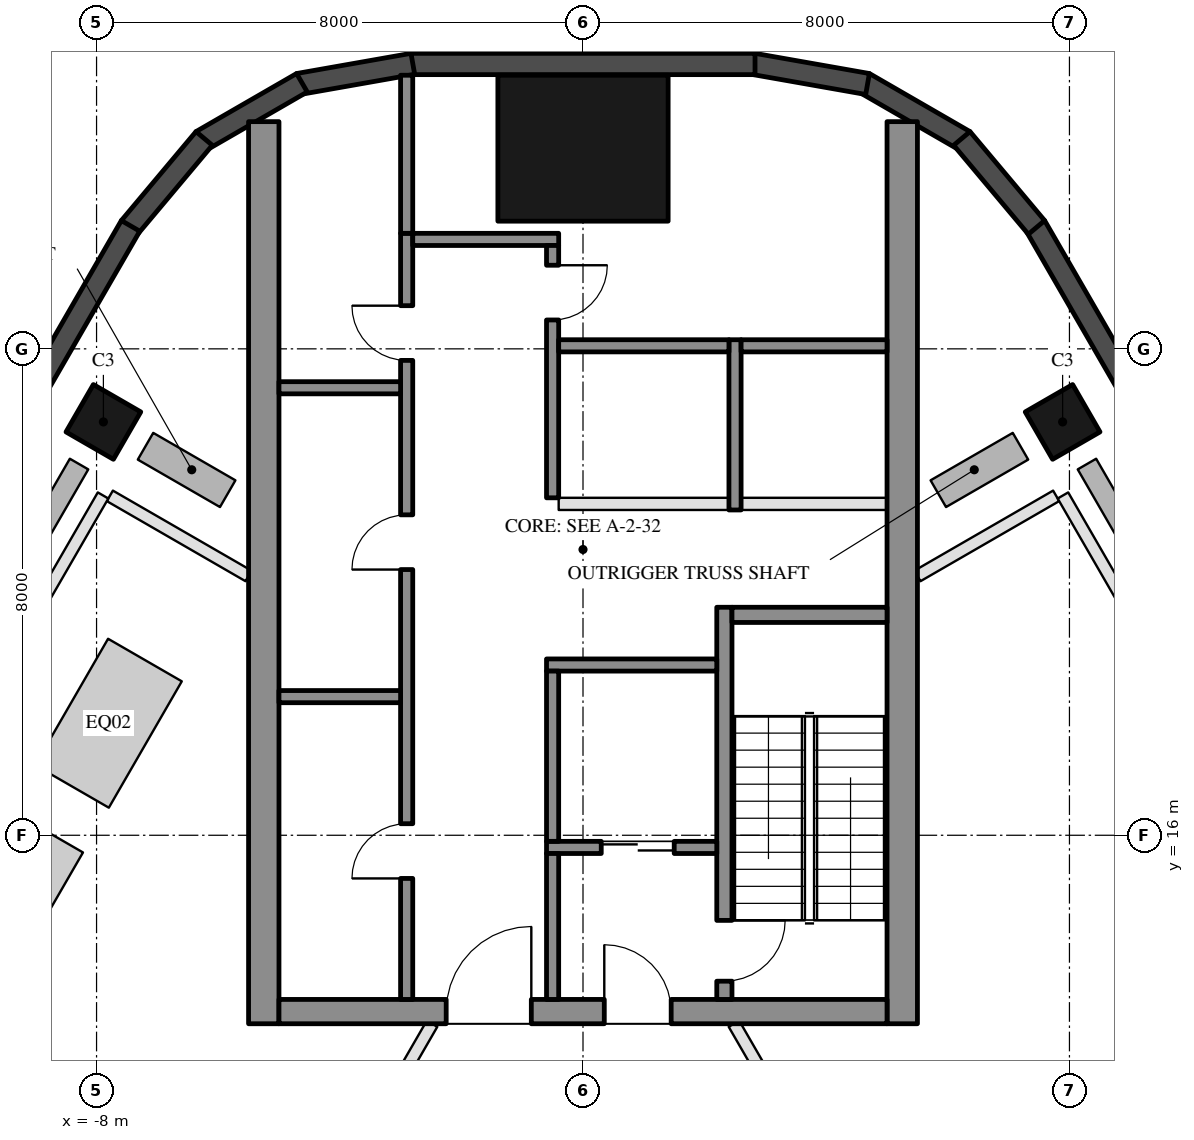
"""IFC4 building model, lengths in metres.
Left out: names, types, materials, properties, quantities, classifications, styles, units other than length and angle.
Written with IfcOpenShell. Run it as: python <this file> out.ifc"""

import sys

from ifc_helpers import new_model, si_unit, direction, frame, frame_2d, origin, origin_2d, place, context, subcontext, project, spatial, rectangle, hollow_rectangle, extrude, element, fill, save


model = new_model("IFC4")
c1 = context("Model", 3, precision=1e-05, world=origin(), true_north=direction((0.0, 1.0)))
c2 = subcontext(c1, "Body", "Model", "MODEL_VIEW")
j1 = project(units=[si_unit("LENGTHUNIT", "METRE"), si_unit("PLANEANGLEUNIT", "RADIAN")], contexts=[c1])
p1 = place(None, origin())
s1 = spatial("IfcSite", under=j1, at=p1, CompositionType="ELEMENT")
p2 = place(p1, origin())
s2 = spatial("IfcBuilding", under=s1, at=p2, CompositionType="ELEMENT")
p3 = place(p2, frame((0.0, 0.0, 142.1)))
s3 = spatial("IfcBuildingStorey", under=s2, at=p3, CompositionType="ELEMENT", Elevation=142.1)
for number, where, z_axis, x_axis in (
    (1, (7.888, 22.798, 0.0), (0.0, 0.0, 1.0), (-0.5, 0.866, 0.0)),
    (2, (-7.888, 22.798, 0.0), (0.0, 0.0, 1.0), (0.5, 0.866, 0.0)),
):
    element("IfcColumn", number, at=place(p3, frame(where, z_axis=z_axis, x_axis=x_axis)), inside=s3, PredefinedType="COLUMN", context=c2, shape_type="SweptSolid", body=[
        extrude(hollow_rectangle(XDim=0.9, YDim=0.9, WallThickness=0.04, at=origin_2d()), origin(), (0.0, 0.0, 1.0), 4.5),
    ])
p4 = place(p3, frame((0.0, 27.3, 0.0), z_axis=(0.0, 0.0, 1.0), x_axis=(1.0, 0.0, 0.0)))
e3 = element("IfcColumn", 3, at=p4, inside=s3, PredefinedType="COLUMN", context=c2, shape_type="SweptSolid", body=[
    extrude(hollow_rectangle(XDim=2.8, YDim=2.4, WallThickness=0.07, at=origin_2d()), origin(), (0.0, 0.0, 1.0), 4.5),
])
for number, where, z_axis, x_axis in (
    (4, (6.277, 27.422, 0.0), (0.0, 0.0, 1.0), (-0.866, 0.5, 0.0)),
    (5, (4.68, 28.356, 0.0), (0.0, 0.0, 1.0), (-0.985, 0.174, 0.0)),
):
    element("IfcWall", number, at=place(p3, frame(where, z_axis=z_axis, x_axis=x_axis)), inside=s3, PredefinedType="SOLIDWALL", context=c2, shape_type="SweptSolid", body=[
        extrude(rectangle(XDim=1.91, YDim=0.35, at=frame_2d((0.955, 0.0))), origin(), (0.0, 0.0, 1.0), 4.35),
    ])
p5 = place(p3, frame((2.829, 28.685, 0.0), z_axis=(0.0, 0.0, 1.0), x_axis=(-1.0, 0.0, 0.0)))
e6 = element("IfcWall", 6, at=p5, inside=s3, PredefinedType="SOLIDWALL", context=c2, shape_type="SweptSolid", body=[
    extrude(rectangle(XDim=5.658, YDim=0.35, at=frame_2d((2.829, 0.0))), origin(), (0.0, 0.0, 1.0), 4.35),
])
for number, where, z_axis, x_axis in (
    (7, (-2.799, 28.688, 0.0), (0.0, 0.0, 1.0), (-0.985, -0.174, 0.0)),
    (8, (-4.623, 28.377, 0.0), (0.0, 0.0, 1.0), (-0.866, -0.5, 0.0)),
):
    element("IfcWall", number, at=place(p3, frame(where, z_axis=z_axis, x_axis=x_axis)), inside=s3, PredefinedType="SOLIDWALL", context=c2, shape_type="SweptSolid", body=[
        extrude(rectangle(XDim=1.91, YDim=0.35, at=frame_2d((0.955, 0.0))), origin(), (0.0, 0.0, 1.0), 4.35),
    ])
p6 = place(p3, frame((-6.23, 27.461, 0.0), z_axis=(0.0, 0.0, 1.0), x_axis=(-0.642808304945, -0.766027077259, 0.0)))
e9 = element("IfcWall", 9, at=p6, inside=s3, PredefinedType="SOLIDWALL", context=c2, shape_type="SweptSolid", body=[
    extrude(rectangle(XDim=1.91, YDim=0.35, at=frame_2d((0.955, 0.0))), origin(), (0.0, 0.0, 1.0), 4.35),
])
for number, where, z_axis, x_axis in (
    (10, (-7.441, 26.022, 0.0), (0.0, 0.0, 1.0), (-0.5, -0.866, 0.0)),
    (11, (26.256, -6.567, 0.0), (0.0, 0.0, 1.0), (-0.5, 0.866, 0.0)),
):
    element("IfcWall", number, at=place(p3, frame(where, z_axis=z_axis, x_axis=x_axis)), inside=s3, PredefinedType="SOLIDWALL", context=c2, shape_type="SweptSolid", body=[
        extrude(rectangle(XDim=37.631, YDim=0.35, at=frame_2d((18.816, 0.0))), origin(), (0.0, 0.0, 1.0), 4.35),
    ])
p7 = place(p3, frame((7.458, 25.998, 0.0), z_axis=(0.0, 0.0, 1.0), x_axis=(-0.642808304945, 0.766027077259, 0.0)))
e12 = element("IfcWall", 12, at=p7, inside=s3, PredefinedType="SOLIDWALL", context=c2, shape_type="SweptSolid", body=[
    extrude(rectangle(XDim=1.91, YDim=0.35, at=frame_2d((0.955, 0.0))), origin(), (0.0, 0.0, 1.0), 4.35),
])
for number, where, z_axis, x_axis in (
    (13, (5.25, 12.9, 0.0), (0.0, 0.0, 1.0), (0.0, 1.0, 0.0)),
    (14, (-5.25, 12.9, 0.0), (0.0, 0.0, 1.0), (0.0, 1.0, 0.0)),
):
    element("IfcWall", number, at=place(p3, frame(where, z_axis=z_axis, x_axis=x_axis)), inside=s3, PredefinedType="SHEAR", context=c2, shape_type="SweptSolid", body=[
        extrude(rectangle(XDim=14.837, YDim=0.5, at=frame_2d((7.418, 0.0))), origin(), (0.0, 0.0, 1.0), 4.3),
    ])
p8 = place(p3, frame((5.0, 13.1, 0.0), z_axis=(0.0, 0.0, 1.0), x_axis=(-1.0, 0.0, 0.0)))
e15 = element("IfcWall", 15, at=p8, inside=s3, PredefinedType="SHEAR", context=c2, shape_type="SweptSolid", body=[
    extrude(rectangle(XDim=10.0, YDim=0.4, at=frame_2d((5.0, 0.0))), origin(), (0.0, 0.0, 1.0), 4.3),
])
p9 = place(p8, frame((3.55, 0.0, 0.0)))
e16 = element("IfcOpeningElement", 16, at=p9, cuts=e15, PredefinedType="OPENING", context=c2, shape_type="SweptSolid", body=[
    extrude(rectangle(XDim=1.1, YDim=2.1, at=frame_2d((0.55, 1.05))), frame((0.0, 0.21, 0.0), z_axis=(0.0, -1.0, 0.0), x_axis=(1.0, 0.0, 0.0)), (0.0, 0.0, 1.0), 0.42),
])
p10 = place(p8, frame((5.85, 0.0, 0.0)))
e17 = element("IfcOpeningElement", 17, at=p10, cuts=e15, PredefinedType="OPENING", context=c2, shape_type="SweptSolid", body=[
    extrude(rectangle(XDim=1.4, YDim=2.1, at=frame_2d((0.7, 1.05))), frame((0.0, 0.21, 0.0), z_axis=(0.0, -1.0, 0.0), x_axis=(1.0, 0.0, 0.0)), (0.0, 0.0, 1.0), 0.42),
])
p11 = place(p3, frame((2.325, 13.3, 0.0), z_axis=(0.0, 0.0, 1.0), x_axis=(0.0, 1.0, 0.0)))
e18 = element("IfcWall", 18, at=p11, inside=s3, PredefinedType="SHEAR", context=c2, shape_type="SweptSolid", body=[
    extrude(rectangle(XDim=6.45, YDim=0.25, at=frame_2d((3.225, 0.0))), origin(), (0.0, 0.0, 1.0), 4.3),
])
p12 = place(p11, frame((0.3, 0.0, 0.0)))
e19 = element("IfcOpeningElement", 19, at=p12, cuts=e18, PredefinedType="OPENING", context=c2, shape_type="SweptSolid", body=[
    extrude(rectangle(XDim=1.0, YDim=2.1, at=frame_2d((0.5, 1.05))), frame((0.0, 0.135, 0.0), z_axis=(0.0, -1.0, 0.0), x_axis=(1.0, 0.0, 0.0)), (0.0, 0.0, 1.0), 0.27),
])
p13 = place(p3, frame((5.0, 19.625, 0.0), z_axis=(0.0, 0.0, 1.0), x_axis=(-1.0, 0.0, 0.0)))
e20 = element("IfcWall", 20, at=p13, inside=s3, PredefinedType="SHEAR", context=c2, shape_type="SweptSolid", body=[
    extrude(rectangle(XDim=2.55, YDim=0.25, at=frame_2d((1.275, 0.0))), origin(), (0.0, 0.0, 1.0), 4.3),
])
p14 = place(p3, frame((2.2, 18.8, 0.0), z_axis=(0.0, 0.0, 1.0), x_axis=(-1.0, 0.0, 0.0)))
e21 = element("IfcWall", 21, at=p14, inside=s3, PredefinedType="SHEAR", context=c2, shape_type="SweptSolid", body=[
    extrude(rectangle(XDim=2.8, YDim=0.2, at=frame_2d((1.4, 0.0))), origin(), (0.0, 0.0, 1.0), 4.3),
])
p15 = place(p3, frame((2.2, 15.8, 0.0), z_axis=(0.0, 0.0, 1.0), x_axis=(-1.0, 0.0, 0.0)))
e22 = element("IfcWall", 22, at=p15, inside=s3, PredefinedType="SHEAR", context=c2, shape_type="SweptSolid", body=[
    extrude(rectangle(XDim=2.8, YDim=0.2, at=frame_2d((1.4, 0.0))), origin(), (0.0, 0.0, 1.0), 4.3),
])
p16 = place(p15, frame((0.7, 0.0, 0.0)))
e23 = element("IfcOpeningElement", 23, at=p16, cuts=e22, PredefinedType="OPENING", context=c2, shape_type="SweptSolid", body=[
    extrude(rectangle(XDim=1.2, YDim=2.1, at=frame_2d((0.6, 1.05))), frame((0.0, 0.11, 0.0), z_axis=(0.0, -1.0, 0.0), x_axis=(1.0, 0.0, 0.0)), (0.0, 0.0, 1.0), 0.22),
])
p17 = place(p3, frame((-0.5, 15.9, 0.0), z_axis=(0.0, 0.0, 1.0), x_axis=(0.0, 1.0, 0.0)))
e24 = element("IfcWall", 24, at=p17, inside=s3, PredefinedType="SHEAR", context=c2, shape_type="SweptSolid", body=[
    extrude(rectangle(XDim=2.8, YDim=0.2, at=frame_2d((1.4, 0.0))), origin(), (0.0, 0.0, 1.0), 4.3),
])
p18 = place(p3, frame((-0.5, 13.3, 0.0), z_axis=(0.0, 0.0, 1.0), x_axis=(0.0, 1.0, 0.0)))
e25 = element("IfcWall", 25, at=p18, inside=s3, PredefinedType="SHEAR", context=c2, shape_type="SweptSolid", body=[
    extrude(rectangle(XDim=2.4, YDim=0.2, at=frame_2d((1.2, 0.0))), origin(), (0.0, 0.0, 1.0), 4.3),
])
p19 = place(p3, frame((-2.9, 13.3, 0.0), z_axis=(0.0, 0.0, 1.0), x_axis=(0.0, 1.0, 0.0)))
e26 = element("IfcWall", 26, at=p19, inside=s3, PredefinedType="SHEAR", context=c2, shape_type="SweptSolid", body=[
    extrude(rectangle(XDim=12.6, YDim=0.2, at=frame_2d((6.3, 0.0))), origin(), (0.0, 0.0, 1.0), 4.3),
])
p20 = place(p19, frame((1.99, 0.0, 0.0)))
e27 = element("IfcOpeningElement", 27, at=p20, cuts=e26, PredefinedType="OPENING", context=c2, shape_type="SweptSolid", body=[
    extrude(rectangle(XDim=0.9, YDim=2.1, at=frame_2d((0.45, 1.05))), frame((0.0, 0.11, 0.0), z_axis=(0.0, -1.0, 0.0), x_axis=(1.0, 0.0, 0.0)), (0.0, 0.0, 1.0), 0.22),
])
p21 = place(p19, frame((7.07, 0.0, 0.0)))
e28 = element("IfcOpeningElement", 28, at=p21, cuts=e26, PredefinedType="OPENING", context=c2, shape_type="SweptSolid", body=[
    extrude(rectangle(XDim=0.9, YDim=2.1, at=frame_2d((0.45, 1.05))), frame((0.0, 0.11, 0.0), z_axis=(0.0, -1.0, 0.0), x_axis=(1.0, 0.0, 0.0)), (0.0, 0.0, 1.0), 0.22),
])
p22 = place(p19, frame((10.51, 0.0, 0.0)))
e29 = element("IfcOpeningElement", 29, at=p22, cuts=e26, PredefinedType="OPENING", context=c2, shape_type="SweptSolid", body=[
    extrude(rectangle(XDim=0.9, YDim=2.1, at=frame_2d((0.45, 1.05))), frame((0.0, 0.11, 0.0), z_axis=(0.0, -1.0, 0.0), x_axis=(1.0, 0.0, 0.0)), (0.0, 0.0, 1.0), 0.22),
])
p23 = place(p3, frame((-0.4, 25.8, 0.0), z_axis=(0.0, 0.0, 1.0), x_axis=(-1.0, 0.0, 0.0)))
e30 = element("IfcWall", 30, at=p23, inside=s3, PredefinedType="SHEAR", context=c2, shape_type="SweptSolid", body=[
    extrude(rectangle(XDim=2.4, YDim=0.2, at=frame_2d((1.2, 0.0))), origin(), (0.0, 0.0, 1.0), 4.3),
])
p24 = place(p3, frame((-0.5, 21.55, 0.0), z_axis=(0.0, 0.0, 1.0), x_axis=(0.0, 1.0, 0.0)))
e31 = element("IfcWall", 31, at=p24, inside=s3, PredefinedType="SHEAR", context=c2, shape_type="SweptSolid", body=[
    extrude(rectangle(XDim=4.15, YDim=0.2, at=frame_2d((2.075, 0.0))), origin(), (0.0, 0.0, 1.0), 4.3),
])
p25 = place(p24, frame((2.925, 0.0, 0.0)))
e32 = element("IfcOpeningElement", 32, at=p25, cuts=e31, PredefinedType="OPENING", context=c2, shape_type="SweptSolid", body=[
    extrude(rectangle(XDim=0.9, YDim=2.1, at=frame_2d((0.45, 1.05))), frame((0.0, 0.11, 0.0), z_axis=(0.0, -1.0, 0.0), x_axis=(1.0, 0.0, 0.0)), (0.0, 0.0, 1.0), 0.22),
])
for number, where, z_axis, x_axis in (
    (33, (-3.0, 18.28, 0.0), (0.0, 0.0, 1.0), (-1.0, 0.0, 0.0)),
    (34, (-3.0, 23.36, 0.0), (0.0, 0.0, 1.0), (-1.0, 0.0, 0.0)),
):
    element("IfcWall", number, at=place(p3, frame(where, z_axis=z_axis, x_axis=x_axis)), inside=s3, PredefinedType="SHEAR", context=c2, shape_type="SweptSolid", body=[
        extrude(rectangle(XDim=2.0, YDim=0.2, at=frame_2d((1.0, 0.0))), origin(), (0.0, 0.0, 1.0), 4.3),
    ])
p26 = place(p3, frame((-2.9, 25.9, 0.0), z_axis=(0.0, 0.0, 1.0), x_axis=(0.0, 1.0, 0.0)))
e35 = element("IfcWall", 35, at=p26, inside=s3, PredefinedType="SHEAR", context=c2, shape_type="SweptSolid", body=[
    extrude(rectangle(XDim=2.6, YDim=0.2, at=frame_2d((1.3, 0.0))), origin(), (0.0, 0.0, 1.0), 4.3),
])
p27 = place(p3, frame((2.5, 21.35, 0.0), z_axis=(0.0, 0.0, 1.0), x_axis=(0.0, 1.0, 0.0)))
e36 = element("IfcWall", 36, at=p27, inside=s3, PredefinedType="SHEAR", context=c2, shape_type="SweptSolid", body=[
    extrude(rectangle(XDim=2.8, YDim=0.2, at=frame_2d((1.4, 0.0))), origin(), (0.0, 0.0, 1.0), 4.3),
])
p28 = place(p3, frame((5.0, 24.05, 0.0), z_axis=(0.0, 0.0, 1.0), x_axis=(-1.0, 0.0, 0.0)))
e37 = element("IfcWall", 37, at=p28, inside=s3, PredefinedType="SHEAR", context=c2, shape_type="SweptSolid", body=[
    extrude(rectangle(XDim=2.4, YDim=0.2, at=frame_2d((1.2, 0.0))), origin(), (0.0, 0.0, 1.0), 4.3),
])
p29 = place(p3, frame((2.4, 24.05, 0.0), z_axis=(0.0, 0.0, 1.0), x_axis=(-1.0, 0.0, 0.0)))
e38 = element("IfcWall", 38, at=p29, inside=s3, PredefinedType="SHEAR", context=c2, shape_type="SweptSolid", body=[
    extrude(rectangle(XDim=2.8, YDim=0.2, at=frame_2d((1.4, 0.0))), origin(), (0.0, 0.0, 1.0), 4.3),
])
p30 = place(p3, frame((5.0, 21.45, 0.0), z_axis=(0.0, 0.0, 1.0), x_axis=(-1.0, 0.0, 0.0)))
e39 = element("IfcWall", 39, at=p30, inside=s3, PredefinedType="PARTITIONING", context=c2, shape_type="SweptSolid", body=[
    extrude(rectangle(XDim=2.4, YDim=0.2, at=frame_2d((1.2, 0.0))), origin(), (0.0, 0.0, 1.0), 4.3),
])
p31 = place(p3, frame((2.4, 21.45, 0.0), z_axis=(0.0, 0.0, 1.0), x_axis=(-1.0, 0.0, 0.0)))
e40 = element("IfcWall", 40, at=p31, inside=s3, PredefinedType="PARTITIONING", context=c2, shape_type="SweptSolid", body=[
    extrude(rectangle(XDim=2.8, YDim=0.2, at=frame_2d((1.4, 0.0))), origin(), (0.0, 0.0, 1.0), 4.3),
])
p32 = place(p3, frame((7.781, 21.582, 0.0), z_axis=(0.0, 0.0, 1.0), x_axis=(-0.865998849027, -0.500045991369, 0.0)))
e41 = element("IfcWall", 41, at=p32, inside=s3, PredefinedType="PARTITIONING", context=c2, shape_type="SweptSolid", body=[
    extrude(rectangle(XDim=2.635, YDim=0.2, at=frame_2d((1.317, 0.0))), origin(), (0.0, 0.0, 1.0), 4.35),
])
p33 = place(p3, frame((22.643, -3.959, 0.0), z_axis=(0.0, 0.0, 1.0), x_axis=(-0.499998500593, 0.866026269466, 0.0)))
e42 = element("IfcWall", 42, at=p33, inside=s3, PredefinedType="PARTITIONING", context=c2, shape_type="SweptSolid", body=[
    extrude(rectangle(XDim=29.5, YDim=0.2, at=frame_2d((14.75, 0.0))), origin(), (0.0, 0.0, 1.0), 3.75),
])
p34 = place(p3, frame((12.413, -4.3, 0.0), z_axis=(0.0, 0.0, 1.0), x_axis=(-0.50000478328, 0.866022642139, 0.0)))
e43 = element("IfcWall", 43, at=p34, inside=s3, PredefinedType="PARTITIONING", context=c2, shape_type="SweptSolid", body=[
    extrude(rectangle(XDim=19.861, YDim=0.2, at=frame_2d((9.931, 0.0))), origin(), (0.0, 0.0, 1.0), 3.75),
])
p35 = place(p34, frame((2.26, 0.0, 0.0)))
e44 = element("IfcOpeningElement", 44, at=p35, cuts=e43, PredefinedType="OPENING", context=c2, shape_type="SweptSolid", body=[
    extrude(rectangle(XDim=1.2, YDim=2.1, at=frame_2d((0.6, 1.05))), frame((0.0, 0.11, 0.0), z_axis=(0.0, -1.0, 0.0), x_axis=(1.0, 0.0, 0.0)), (0.0, 0.0, 1.0), 0.22),
])
p36 = place(p34, frame((7.982, 0.0, 0.0)))
e45 = element("IfcOpeningElement", 45, at=p36, cuts=e43, PredefinedType="OPENING", context=c2, shape_type="SweptSolid", body=[
    extrude(rectangle(XDim=1.2, YDim=2.1, at=frame_2d((0.6, 1.05))), frame((0.0, 0.11, 0.0), z_axis=(0.0, -1.0, 0.0), x_axis=(1.0, 0.0, 0.0)), (0.0, 0.0, 1.0), 0.22),
])
p37 = place(p34, frame((12.929, 0.0, 0.0)))
e46 = element("IfcOpeningElement", 46, at=p37, cuts=e43, PredefinedType="OPENING", context=c2, shape_type="SweptSolid", body=[
    extrude(rectangle(XDim=1.2, YDim=2.1, at=frame_2d((0.6, 1.05))), frame((0.0, 0.11, 0.0), z_axis=(0.0, -1.0, 0.0), x_axis=(1.0, 0.0, 0.0)), (0.0, 0.0, 1.0), 0.22),
])
p38 = place(p34, frame((17.151, 0.0, 0.0)))
e47 = element("IfcOpeningElement", 47, at=p38, cuts=e43, PredefinedType="OPENING", context=c2, shape_type="SweptSolid", body=[
    extrude(rectangle(XDim=1.2, YDim=2.1, at=frame_2d((0.6, 1.05))), frame((0.0, 0.11, 0.0), z_axis=(0.0, -1.0, 0.0), x_axis=(1.0, 0.0, 0.0)), (0.0, 0.0, 1.0), 0.22),
])
p39 = place(p3, frame((-7.781, 21.582, 0.0), z_axis=(0.0, 0.0, 1.0), x_axis=(0.865998849027, -0.500045991369, 0.0)))
e48 = element("IfcWall", 48, at=p39, inside=s3, PredefinedType="PARTITIONING", context=c2, shape_type="SweptSolid", body=[
    extrude(rectangle(XDim=2.635, YDim=0.2, at=frame_2d((1.317, 0.0))), origin(), (0.0, 0.0, 1.0), 4.35),
])
p40 = place(p3, frame((-7.893, 21.589, 0.0), z_axis=(0.0, 0.0, 1.0), x_axis=(-0.499998500593, -0.866026269466, 0.0)))
e49 = element("IfcWall", 49, at=p40, inside=s3, PredefinedType="PARTITIONING", context=c2, shape_type="SweptSolid", body=[
    extrude(rectangle(XDim=29.5, YDim=0.2, at=frame_2d((14.75, 0.0))), origin(), (0.0, 0.0, 1.0), 3.75),
])
p41 = place(p3, frame((-2.482, 12.9, 0.0), z_axis=(0.0, 0.0, 1.0), x_axis=(-0.50000478328, -0.866022642139, 0.0)))
e50 = element("IfcWall", 50, at=p41, inside=s3, PredefinedType="PARTITIONING", context=c2, shape_type="SweptSolid", body=[
    extrude(rectangle(XDim=19.861, YDim=0.2, at=frame_2d((9.931, 0.0))), origin(), (0.0, 0.0, 1.0), 3.75),
])
p42 = place(p41, frame((3.371, 0.0, 0.0)))
e51 = element("IfcOpeningElement", 51, at=p42, cuts=e50, PredefinedType="OPENING", context=c2, shape_type="SweptSolid", body=[
    extrude(rectangle(XDim=1.2, YDim=2.1, at=frame_2d((0.6, 1.05))), frame((0.0, 0.11, 0.0), z_axis=(0.0, -1.0, 0.0), x_axis=(1.0, 0.0, 0.0)), (0.0, 0.0, 1.0), 0.22),
])
p43 = place(p41, frame((10.581, 0.0, 0.0)))
e52 = element("IfcOpeningElement", 52, at=p43, cuts=e50, PredefinedType="OPENING", context=c2, shape_type="SweptSolid", body=[
    extrude(rectangle(XDim=1.2, YDim=2.1, at=frame_2d((0.6, 1.05))), frame((0.0, 0.11, 0.0), z_axis=(0.0, -1.0, 0.0), x_axis=(1.0, 0.0, 0.0)), (0.0, 0.0, 1.0), 0.22),
])
p44 = place(p41, frame((16.54, 0.0, 0.0)))
e53 = element("IfcOpeningElement", 53, at=p44, cuts=e50, PredefinedType="OPENING", context=c2, shape_type="SweptSolid", body=[
    extrude(rectangle(XDim=1.2, YDim=2.1, at=frame_2d((0.6, 1.05))), frame((0.0, 0.11, 0.0), z_axis=(0.0, -1.0, 0.0), x_axis=(1.0, 0.0, 0.0)), (0.0, 0.0, 1.0), 0.22),
])
p45 = place(p16, origin())
e54 = element("IfcDoor", 54, at=p45, inside=s3, OperationType="DOUBLE_DOOR_SLIDING", PredefinedType="DOOR", context=c2, shape_type="SweptSolid", body=[
    extrude(rectangle(XDim=1.2, YDim=2.1, at=frame_2d((0.6, 1.05))), frame((0.0, 0.025, 0.0), z_axis=(0.0, -1.0, 0.0), x_axis=(1.0, 0.0, 0.0)), (0.0, 0.0, 1.0), 0.05),
])
fill(e23, e54)
p46 = place(p20, origin())
e55 = element("IfcDoor", 55, at=p46, inside=s3, OperationType="SINGLE_SWING_LEFT", PredefinedType="DOOR", context=c2, shape_type="SweptSolid", body=[
    extrude(rectangle(XDim=0.9, YDim=2.1, at=frame_2d((0.45, 1.05))), frame((0.0, 0.025, 0.0), z_axis=(0.0, -1.0, 0.0), x_axis=(1.0, 0.0, 0.0)), (0.0, 0.0, 1.0), 0.05),
])
fill(e27, e55)
p47 = place(p21, origin())
e56 = element("IfcDoor", 56, at=p47, inside=s3, OperationType="SINGLE_SWING_LEFT", PredefinedType="DOOR", context=c2, shape_type="SweptSolid", body=[
    extrude(rectangle(XDim=0.9, YDim=2.1, at=frame_2d((0.45, 1.05))), frame((0.0, 0.025, 0.0), z_axis=(0.0, -1.0, 0.0), x_axis=(1.0, 0.0, 0.0)), (0.0, 0.0, 1.0), 0.05),
])
fill(e28, e56)
p48 = place(p22, origin())
e57 = element("IfcDoor", 57, at=p48, inside=s3, OperationType="SINGLE_SWING_RIGHT", PredefinedType="DOOR", context=c2, shape_type="SweptSolid", body=[
    extrude(rectangle(XDim=0.9, YDim=2.1, at=frame_2d((0.45, 1.05))), frame((0.0, 0.025, 0.0), z_axis=(0.0, -1.0, 0.0), x_axis=(1.0, 0.0, 0.0)), (0.0, 0.0, 1.0), 0.05),
])
fill(e29, e57)
p49 = place(p25, frame((0.9, 0.0, 0.0), z_axis=(0.0, 0.0, 1.0), x_axis=(-1.0, 0.0, 0.0)))
e58 = element("IfcDoor", 58, at=p49, inside=s3, OperationType="SINGLE_SWING_LEFT", PredefinedType="DOOR", context=c2, shape_type="SweptSolid", body=[
    extrude(rectangle(XDim=0.9, YDim=2.1, at=frame_2d((0.45, 1.05))), frame((0.0, 0.025, 0.0), z_axis=(0.0, -1.0, 0.0), x_axis=(1.0, 0.0, 0.0)), (0.0, 0.0, 1.0), 0.05),
])
fill(e32, e58)
p50 = place(p9, frame((1.1, 0.0, 0.0), z_axis=(0.0, 0.0, 1.0), x_axis=(-1.0, 0.0, 0.0)))
e59 = element("IfcDoor", 59, at=p50, inside=s3, OperationType="SINGLE_SWING_LEFT", PredefinedType="DOOR", context=c2, shape_type="SweptSolid", body=[
    extrude(rectangle(XDim=1.1, YDim=2.1, at=frame_2d((0.55, 1.05))), frame((0.0, 0.025, 0.0), z_axis=(0.0, -1.0, 0.0), x_axis=(1.0, 0.0, 0.0)), (0.0, 0.0, 1.0), 0.05),
])
fill(e16, e59)
p51 = place(p10, frame((1.4, 0.0, 0.0), z_axis=(0.0, 0.0, 1.0), x_axis=(-1.0, 0.0, 0.0)))
e60 = element("IfcDoor", 60, at=p51, inside=s3, OperationType="DOUBLE_DOOR_SINGLE_SWING", PredefinedType="DOOR", context=c2, shape_type="SweptSolid", body=[
    extrude(rectangle(XDim=1.4, YDim=2.1, at=frame_2d((0.7, 1.05))), frame((0.0, 0.025, 0.0), z_axis=(0.0, -1.0, 0.0), x_axis=(1.0, 0.0, 0.0)), (0.0, 0.0, 1.0), 0.05),
])
fill(e17, e60)
p52 = place(p12, frame((1.0, 0.0, 0.0), z_axis=(0.0, 0.0, 1.0), x_axis=(-1.0, 0.0, 0.0)))
e61 = element("IfcDoor", 61, at=p52, inside=s3, OperationType="SINGLE_SWING_LEFT", PredefinedType="DOOR", context=c2, shape_type="SweptSolid", body=[
    extrude(rectangle(XDim=1.0, YDim=2.1, at=frame_2d((0.5, 1.05))), frame((0.0, 0.025, 0.0), z_axis=(0.0, -1.0, 0.0), x_axis=(1.0, 0.0, 0.0)), (0.0, 0.0, 1.0), 0.05),
])
fill(e19, e61)
save(model, sys.argv[1])
